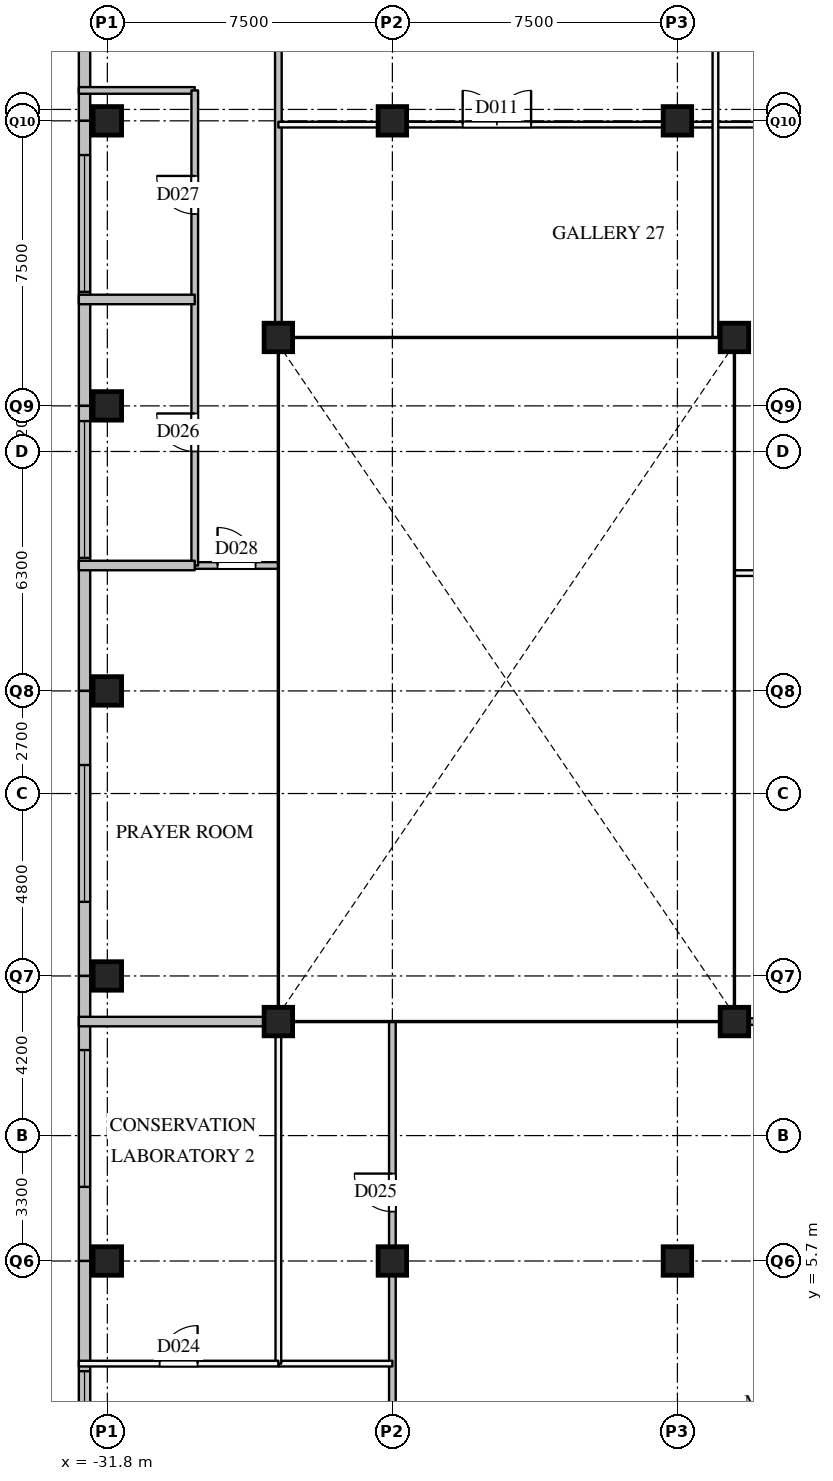
"""IFC4 building model, lengths in metres.
Left out: names, types, materials, properties, quantities, classifications, styles, units other than length and angle.
Written with IfcOpenShell. Run it as: python <this file> out.ifc"""

import sys

from ifc_helpers import new_model, si_unit, direction, frame, frame_2d, origin, origin_2d, place, context, subcontext, project, spatial, rectangle, extrude, element, fill, save


model = new_model("IFC4")
c1 = context("Model", 3, precision=1e-05, world=origin(), true_north=direction((0.0, 1.0)))
c2 = subcontext(c1, "Body", "Model", "MODEL_VIEW")
j1 = project(units=[si_unit("LENGTHUNIT", "METRE"), si_unit("PLANEANGLEUNIT", "RADIAN")], contexts=[c1])
p1 = place(None, origin())
s1 = spatial("IfcSite", under=j1, at=p1, CompositionType="ELEMENT")
p2 = place(p1, origin())
s2 = spatial("IfcBuilding", under=s1, at=p2, CompositionType="ELEMENT")
p3 = place(p2, frame((0.0, 0.0, 21.0)))
s3 = spatial("IfcBuildingStorey", under=s2, at=p3, CompositionType="ELEMENT", Elevation=21.0)
for number, where, z_axis, x_axis in (
    (1, (-31.8, 5.7, 0.0), (0.0, 0.0, 1.0), (1.0, 0.0, 0.0)),
    (2, (-31.8, 13.2, 0.0), (0.0, 0.0, 1.0), (1.0, 0.0, 0.0)),
    (3, (-31.8, 20.7, 0.0), (0.0, 0.0, 1.0), (1.0, 0.0, 0.0)),
    (4, (-31.8, 28.2, 0.0), (0.0, 0.0, 1.0), (1.0, 0.0, 0.0)),
    (5, (-31.8, 35.7, 0.0), (0.0, 0.0, 1.0), (1.0, 0.0, 0.0)),
    (6, (-24.3, 5.7, 0.0), (0.0, 0.0, 1.0), (1.0, 0.0, 0.0)),
    (7, (-24.3, 35.7, 0.0), (0.0, 0.0, 1.0), (1.0, 0.0, 0.0)),
    (8, (-16.8, 5.7, 0.0), (0.0, 0.0, 1.0), (1.0, 0.0, 0.0)),
    (9, (-16.8, 35.7, 0.0), (0.0, 0.0, 1.0), (1.0, 0.0, 0.0)),
    (10, (-27.3, 12.0, 0.0), (0.0, 0.0, 1.0), (1.0, 0.0, 0.0)),
    (11, (-15.3, 12.0, 0.0), (0.0, 0.0, 1.0), (1.0, 0.0, 0.0)),
    (12, (-15.3, 30.0, 0.0), (0.0, 0.0, 1.0), (1.0, 0.0, 0.0)),
    (13, (-27.3, 30.0, 0.0), (0.0, 0.0, 1.0), (1.0, 0.0, 0.0)),
):
    element("IfcColumn", number, at=place(p3, frame(where, z_axis=z_axis, x_axis=x_axis)), inside=s3, PredefinedType="COLUMN", context=c2, shape_type="SweptSolid", body=[
        extrude(rectangle(XDim=0.75, YDim=0.75, at=origin_2d()), origin(), (0.0, 0.0, 1.0), 5.0),
    ])
p4 = place(p3, frame((-32.4, 43.2, 0.0), z_axis=(0.0, 0.0, 1.0), x_axis=(0.0, -1.0, 0.0)))
e14 = element("IfcWall", 14, at=p4, inside=s3, PredefinedType="SOLIDWALL", context=c2, shape_type="SweptSolid", body=[
    extrude(rectangle(XDim=7.5, YDim=0.3, at=frame_2d((3.75, 0.0))), origin(), (0.0, 0.0, 1.0), 4.59),
])
p5 = place(p4, frame((1.95, 0.0, 2.4)))
e15 = element("IfcOpeningElement", 15, at=p5, cuts=e14, PredefinedType="OPENING", context=c2, shape_type="SweptSolid", body=[
    extrude(rectangle(XDim=3.6, YDim=1.2, at=frame_2d((1.8, 0.6))), frame((0.0, 0.16, 0.0), z_axis=(0.0, -1.0, 0.0), x_axis=(1.0, 0.0, 0.0)), (0.0, 0.0, 1.0), 0.32),
])
p6 = place(p3, frame((-32.4, 35.7, 0.0), z_axis=(0.0, 0.0, 1.0), x_axis=(0.0, -1.0, 0.0)))
e16 = element("IfcWall", 16, at=p6, inside=s3, PredefinedType="SOLIDWALL", context=c2, shape_type="SweptSolid", body=[
    extrude(rectangle(XDim=7.5, YDim=0.3, at=frame_2d((3.75, 0.0))), origin(), (0.0, 0.0, 1.0), 4.59),
])
p7 = place(p6, frame((0.9, 0.0, 2.4)))
e17 = element("IfcOpeningElement", 17, at=p7, cuts=e16, PredefinedType="OPENING", context=c2, shape_type="SweptSolid", body=[
    extrude(rectangle(XDim=3.6, YDim=1.2, at=frame_2d((1.8, 0.6))), frame((0.0, 0.16, 0.0), z_axis=(0.0, -1.0, 0.0), x_axis=(1.0, 0.0, 0.0)), (0.0, 0.0, 1.0), 0.32),
])
p8 = place(p3, frame((-32.4, 28.2, 0.0), z_axis=(0.0, 0.0, 1.0), x_axis=(0.0, -1.0, 0.0)))
e18 = element("IfcWall", 18, at=p8, inside=s3, PredefinedType="SOLIDWALL", context=c2, shape_type="SweptSolid", body=[
    extrude(rectangle(XDim=7.5, YDim=0.3, at=frame_2d((3.75, 0.0))), origin(), (0.0, 0.0, 1.0), 4.59),
])
p9 = place(p8, frame((0.4, 0.0, 2.4)))
e19 = element("IfcOpeningElement", 19, at=p9, cuts=e18, PredefinedType="OPENING", context=c2, shape_type="SweptSolid", body=[
    extrude(rectangle(XDim=3.6, YDim=1.2, at=frame_2d((1.8, 0.6))), frame((0.0, 0.16, 0.0), z_axis=(0.0, -1.0, 0.0), x_axis=(1.0, 0.0, 0.0)), (0.0, 0.0, 1.0), 0.32),
])
p10 = place(p3, frame((-32.4, 20.7, 0.0), z_axis=(0.0, 0.0, 1.0), x_axis=(0.0, -1.0, 0.0)))
e20 = element("IfcWall", 20, at=p10, inside=s3, PredefinedType="SOLIDWALL", context=c2, shape_type="SweptSolid", body=[
    extrude(rectangle(XDim=7.5, YDim=0.3, at=frame_2d((3.75, 0.0))), origin(), (0.0, 0.0, 1.0), 4.59),
])
p11 = place(p10, frame((1.95, 0.0, 2.4)))
e21 = element("IfcOpeningElement", 21, at=p11, cuts=e20, PredefinedType="OPENING", context=c2, shape_type="SweptSolid", body=[
    extrude(rectangle(XDim=3.6, YDim=1.2, at=frame_2d((1.8, 0.6))), frame((0.0, 0.16, 0.0), z_axis=(0.0, -1.0, 0.0), x_axis=(1.0, 0.0, 0.0)), (0.0, 0.0, 1.0), 0.32),
])
p12 = place(p3, frame((-32.4, 13.2, 0.0), z_axis=(0.0, 0.0, 1.0), x_axis=(0.0, -1.0, 0.0)))
e22 = element("IfcWall", 22, at=p12, inside=s3, PredefinedType="SOLIDWALL", context=c2, shape_type="SweptSolid", body=[
    extrude(rectangle(XDim=7.5, YDim=0.3, at=frame_2d((3.75, 0.0))), origin(), (0.0, 0.0, 1.0), 4.59),
])
p13 = place(p12, frame((1.95, 0.0, 2.4)))
e23 = element("IfcOpeningElement", 23, at=p13, cuts=e22, PredefinedType="OPENING", context=c2, shape_type="SweptSolid", body=[
    extrude(rectangle(XDim=3.6, YDim=1.2, at=frame_2d((1.8, 0.6))), frame((0.0, 0.16, 0.0), z_axis=(0.0, -1.0, 0.0), x_axis=(1.0, 0.0, 0.0)), (0.0, 0.0, 1.0), 0.32),
])
p14 = place(p3, frame((-32.4, 5.7, 0.0), z_axis=(0.0, 0.0, 1.0), x_axis=(0.0, -1.0, 0.0)))
e24 = element("IfcWall", 24, at=p14, inside=s3, PredefinedType="SOLIDWALL", context=c2, shape_type="SweptSolid", body=[
    extrude(rectangle(XDim=7.5, YDim=0.3, at=frame_2d((3.75, 0.0))), origin(), (0.0, 0.0, 1.0), 4.59),
])
p15 = place(p14, frame((2.9, 0.0, 2.4)))
e25 = element("IfcOpeningElement", 25, at=p15, cuts=e24, PredefinedType="OPENING", context=c2, shape_type="SweptSolid", body=[
    extrude(rectangle(XDim=3.6, YDim=1.2, at=frame_2d((1.8, 0.6))), frame((0.0, 0.16, 0.0), z_axis=(0.0, -1.0, 0.0), x_axis=(1.0, 0.0, 0.0)), (0.0, 0.0, 1.0), 0.32),
])
p16 = place(p3, frame((-15.3, 12.0, 0.0), z_axis=(0.0, 0.0, 1.0), x_axis=(1.0, 0.0, 0.0)))
e26 = element("IfcWall", 26, at=p16, inside=s3, PredefinedType="PARTITIONING", context=c2, shape_type="SweptSolid", body=[
    extrude(rectangle(XDim=11.25, YDim=0.175, at=frame_2d((5.625, 0.0))), origin(), (0.0, 0.0, 1.0), 3.79),
])
p17 = place(p3, frame((-29.5, 24.0, 0.0), z_axis=(0.0, 0.0, 1.0), x_axis=(1.0, 0.0, 0.0)))
e27 = element("IfcWall", 27, at=p17, inside=s3, PredefinedType="PARTITIONING", context=c2, shape_type="SweptSolid", body=[
    extrude(rectangle(XDim=2.2, YDim=0.175, at=frame_2d((1.1, 0.0))), origin(), (0.0, 0.0, 1.0), 4.55),
])
p18 = place(p17, frame((0.6, 0.0, 0.0)))
e28 = element("IfcOpeningElement", 28, at=p18, cuts=e27, PredefinedType="OPENING", context=c2, shape_type="SweptSolid", body=[
    extrude(rectangle(XDim=1.0, YDim=2.1, at=frame_2d((0.5, 1.05))), frame((0.0, 0.097, 0.0), z_axis=(0.0, -1.0, 0.0), x_axis=(1.0, 0.0, 0.0)), (0.0, 0.0, 1.0), 0.195),
])
p19 = place(p3, frame((-32.55, 36.5, 0.0), z_axis=(0.0, 0.0, 1.0), x_axis=(1.0, 0.0, 0.0)))
e29 = element("IfcWall", 29, at=p19, inside=s3, PredefinedType="PARTITIONING", context=c2, shape_type="SweptSolid", body=[
    extrude(rectangle(XDim=3.05, YDim=0.175, at=frame_2d((1.525, 0.0))), origin(), (0.0, 0.0, 1.0), 3.79),
])
p20 = place(p3, frame((-29.5, 24.0, 0.0), z_axis=(0.0, 0.0, 1.0), x_axis=(0.0, 1.0, 0.0)))
e30 = element("IfcWall", 30, at=p20, inside=s3, PredefinedType="PARTITIONING", context=c2, shape_type="SweptSolid", body=[
    extrude(rectangle(XDim=12.5, YDim=0.175, at=frame_2d((6.25, 0.0))), origin(), (0.0, 0.0, 1.0), 3.79),
])
p21 = place(p20, frame((3.0, 0.0, 0.0)))
e31 = element("IfcOpeningElement", 31, at=p21, cuts=e30, PredefinedType="OPENING", context=c2, shape_type="SweptSolid", body=[
    extrude(rectangle(XDim=1.0, YDim=2.1, at=frame_2d((0.5, 1.05))), frame((0.0, 0.097, 0.0), z_axis=(0.0, -1.0, 0.0), x_axis=(1.0, 0.0, 0.0)), (0.0, 0.0, 1.0), 0.195),
])
p22 = place(p20, frame((9.25, 0.0, 0.0)))
e32 = element("IfcOpeningElement", 32, at=p22, cuts=e30, PredefinedType="OPENING", context=c2, shape_type="SweptSolid", body=[
    extrude(rectangle(XDim=1.0, YDim=2.1, at=frame_2d((0.5, 1.05))), frame((0.0, 0.097, 0.0), z_axis=(0.0, -1.0, 0.0), x_axis=(1.0, 0.0, 0.0)), (0.0, 0.0, 1.0), 0.195),
])
p23 = place(p3, frame((-27.3, 30.0, 0.0), z_axis=(0.0, 0.0, 1.0), x_axis=(0.0, 1.0, 0.0)))
e33 = element("IfcWall", 33, at=p23, inside=s3, PredefinedType="PARTITIONING", context=c2, shape_type="SweptSolid", body=[
    extrude(rectangle(XDim=17.35, YDim=0.175, at=frame_2d((8.675, 0.0))), origin(), (0.0, 0.0, 1.0), 3.79),
])
p24 = place(p23, frame((10.975, 0.0, 0.0)))
e34 = element("IfcOpeningElement", 34, at=p24, cuts=e33, PredefinedType="OPENING", context=c2, shape_type="SweptSolid", body=[
    extrude(rectangle(XDim=1.0, YDim=2.1, at=frame_2d((0.5, 1.05))), frame((0.0, 0.097, 0.0), z_axis=(0.0, -1.0, 0.0), x_axis=(1.0, 0.0, 0.0)), (0.0, 0.0, 1.0), 0.195),
])
p25 = place(p3, frame((-24.3, -9.3, 0.0), z_axis=(0.0, 0.0, 1.0), x_axis=(0.0, 1.0, 0.0)))
e35 = element("IfcWall", 35, at=p25, inside=s3, PredefinedType="PARTITIONING", context=c2, shape_type="SweptSolid", body=[
    extrude(rectangle(XDim=21.3, YDim=0.175, at=frame_2d((10.65, 0.0))), origin(), (0.0, 0.0, 1.0), 3.79),
])
p26 = place(p25, frame((2.5, 0.0, 0.0)))
e36 = element("IfcOpeningElement", 36, at=p26, cuts=e35, PredefinedType="OPENING", context=c2, shape_type="SweptSolid", body=[
    extrude(rectangle(XDim=1.0, YDim=2.1, at=frame_2d((0.5, 1.05))), frame((0.0, 0.097, 0.0), z_axis=(0.0, -1.0, 0.0), x_axis=(1.0, 0.0, 0.0)), (0.0, 0.0, 1.0), 0.195),
])
p27 = place(p25, frame((16.3, 0.0, 0.0)))
e37 = element("IfcOpeningElement", 37, at=p27, cuts=e35, PredefinedType="OPENING", context=c2, shape_type="SweptSolid", body=[
    extrude(rectangle(XDim=1.0, YDim=2.1, at=frame_2d((0.5, 1.05))), frame((0.0, 0.097, 0.0), z_axis=(0.0, -1.0, 0.0), x_axis=(1.0, 0.0, 0.0)), (0.0, 0.0, 1.0), 0.195),
])
p28 = place(p3, frame((-27.3, 3.0, 0.0), z_axis=(0.0, 0.0, 1.0), x_axis=(1.0, 0.0, 0.0)))
e38 = element("IfcWall", 38, at=p28, inside=s3, PredefinedType="PARTITIONING", context=c2, shape_type="SweptSolid", body=[
    extrude(rectangle(XDim=3.0, YDim=0.15, at=frame_2d((1.5, 0.0))), origin(), (0.0, 0.0, 1.0), 3.79),
])
p29 = place(p3, frame((-15.3, 23.8, 0.0), z_axis=(0.0, 0.0, 1.0), x_axis=(1.0, 0.0, 0.0)))
e39 = element("IfcWall", 39, at=p29, inside=s3, PredefinedType="PARTITIONING", context=c2, shape_type="SweptSolid", body=[
    extrude(rectangle(XDim=11.25, YDim=0.15, at=frame_2d((5.625, 0.0))), origin(), (0.0, 0.0, 1.0), 3.79),
])
p30 = place(p3, frame((-27.3, 35.6, 0.0), z_axis=(0.0, 0.0, 1.0), x_axis=(1.0, 0.0, 0.0)))
e40 = element("IfcWall", 40, at=p30, inside=s3, PredefinedType="PARTITIONING", context=c2, shape_type="SweptSolid", body=[
    extrude(rectangle(XDim=23.25, YDim=0.15, at=frame_2d((11.625, 0.0))), origin(), (0.0, 0.0, 1.0), 3.79),
])
p31 = place(p30, frame((4.85, 0.0, 0.0)))
e41 = element("IfcOpeningElement", 41, at=p31, cuts=e40, PredefinedType="OPENING", context=c2, shape_type="SweptSolid", body=[
    extrude(rectangle(XDim=1.8, YDim=2.1, at=frame_2d((0.9, 1.05))), frame((0.0, 0.085, 0.0), z_axis=(0.0, -1.0, 0.0), x_axis=(1.0, 0.0, 0.0)), (0.0, 0.0, 1.0), 0.17),
])
p32 = place(p3, frame((-27.3, 3.0, 0.0), z_axis=(0.0, 0.0, 1.0), x_axis=(0.0, 1.0, 0.0)))
e42 = element("IfcWall", 42, at=p32, inside=s3, PredefinedType="PARTITIONING", context=c2, shape_type="SweptSolid", body=[
    extrude(rectangle(XDim=9.0, YDim=0.15, at=frame_2d((4.5, 0.0))), origin(), (0.0, 0.0, 1.0), 3.79),
])
p33 = place(p3, frame((-15.8, 30.0, 0.0), z_axis=(0.0, 0.0, 1.0), x_axis=(0.0, 1.0, 0.0)))
e43 = element("IfcWall", 43, at=p33, inside=s3, PredefinedType="PARTITIONING", context=c2, shape_type="SweptSolid", body=[
    extrude(rectangle(XDim=17.4, YDim=0.15, at=frame_2d((8.7, 0.0))), origin(), (0.0, 0.0, 1.0), 3.79),
])
p34 = place(p3, frame((-32.55, 3.0, 0.0), z_axis=(0.0, 0.0, 1.0), x_axis=(1.0, 0.0, 0.0)))
e44 = element("IfcWall", 44, at=p34, inside=s3, PredefinedType="PARTITIONING", context=c2, shape_type="SweptSolid", body=[
    extrude(rectangle(XDim=5.25, YDim=0.15, at=frame_2d((2.625, 0.0))), origin(), (0.0, 0.0, 1.0), 3.79),
])
p35 = place(p34, frame((2.125, 0.0, 0.0)))
e45 = element("IfcOpeningElement", 45, at=p35, cuts=e44, PredefinedType="OPENING", context=c2, shape_type="SweptSolid", body=[
    extrude(rectangle(XDim=1.0, YDim=2.1, at=frame_2d((0.5, 1.05))), frame((0.0, 0.085, 0.0), z_axis=(0.0, -1.0, 0.0), x_axis=(1.0, 0.0, 0.0)), (0.0, 0.0, 1.0), 0.17),
])
p36 = place(p3, frame((-32.55, 12.0, 0.0), z_axis=(0.0, 0.0, 1.0), x_axis=(1.0, 0.0, 0.0)))
e46 = element("IfcWall", 46, at=p36, inside=s3, PredefinedType="PARTITIONING", context=c2, shape_type="SweptSolid", body=[
    extrude(rectangle(XDim=5.25, YDim=0.25, at=frame_2d((2.625, 0.0))), origin(), (0.0, 0.0, 1.0), 3.79),
])
for number, where, z_axis, x_axis in (
    (47, (-32.55, 24.0, 0.0), (0.0, 0.0, 1.0), (1.0, 0.0, 0.0)),
    (48, (-32.55, 31.0, 0.0), (0.0, 0.0, 1.0), (1.0, 0.0, 0.0)),
):
    element("IfcWall", number, at=place(p3, frame(where, z_axis=z_axis, x_axis=x_axis)), inside=s3, PredefinedType="PARTITIONING", context=c2, shape_type="SweptSolid", body=[
        extrude(rectangle(XDim=3.05, YDim=0.25, at=frame_2d((1.525, 0.0))), origin(), (0.0, 0.0, 1.0), 3.79),
    ])
p37 = place(p7, origin())
e49 = element("IfcWindow", 49, at=p37, inside=s3, PartitioningType="SINGLE_PANEL", PredefinedType="WINDOW", context=c2, shape_type="SweptSolid", body=[
    extrude(rectangle(XDim=3.6, YDim=1.2, at=frame_2d((1.8, 0.6))), frame((0.0, 0.03, 0.0), z_axis=(0.0, -1.0, 0.0), x_axis=(1.0, 0.0, 0.0)), (0.0, 0.0, 1.0), 0.06),
])
fill(e17, e49)
p38 = place(p9, origin())
e50 = element("IfcWindow", 50, at=p38, inside=s3, PartitioningType="SINGLE_PANEL", PredefinedType="WINDOW", context=c2, shape_type="SweptSolid", body=[
    extrude(rectangle(XDim=3.6, YDim=1.2, at=frame_2d((1.8, 0.6))), frame((0.0, 0.03, 0.0), z_axis=(0.0, -1.0, 0.0), x_axis=(1.0, 0.0, 0.0)), (0.0, 0.0, 1.0), 0.06),
])
fill(e19, e50)
p39 = place(p11, origin())
e51 = element("IfcWindow", 51, at=p39, inside=s3, PartitioningType="SINGLE_PANEL", PredefinedType="WINDOW", context=c2, shape_type="SweptSolid", body=[
    extrude(rectangle(XDim=3.6, YDim=1.2, at=frame_2d((1.8, 0.6))), frame((0.0, 0.03, 0.0), z_axis=(0.0, -1.0, 0.0), x_axis=(1.0, 0.0, 0.0)), (0.0, 0.0, 1.0), 0.06),
])
fill(e21, e51)
p40 = place(p13, origin())
e52 = element("IfcWindow", 52, at=p40, inside=s3, PartitioningType="SINGLE_PANEL", PredefinedType="WINDOW", context=c2, shape_type="SweptSolid", body=[
    extrude(rectangle(XDim=3.6, YDim=1.2, at=frame_2d((1.8, 0.6))), frame((0.0, 0.03, 0.0), z_axis=(0.0, -1.0, 0.0), x_axis=(1.0, 0.0, 0.0)), (0.0, 0.0, 1.0), 0.06),
])
fill(e23, e52)
p41 = place(p15, origin())
e53 = element("IfcWindow", 53, at=p41, inside=s3, PartitioningType="SINGLE_PANEL", PredefinedType="WINDOW", context=c2, shape_type="SweptSolid", body=[
    extrude(rectangle(XDim=3.6, YDim=1.2, at=frame_2d((1.8, 0.6))), frame((0.0, 0.03, 0.0), z_axis=(0.0, -1.0, 0.0), x_axis=(1.0, 0.0, 0.0)), (0.0, 0.0, 1.0), 0.06),
])
fill(e25, e53)
p42 = place(p31, origin())
e54 = element("IfcDoor", 54, at=p42, inside=s3, OperationType="DOUBLE_DOOR_SINGLE_SWING", PredefinedType="DOOR", context=c2, shape_type="SweptSolid", body=[
    extrude(rectangle(XDim=1.8, YDim=2.1, at=frame_2d((0.9, 1.05))), frame((0.0, 0.025, 0.0), z_axis=(0.0, -1.0, 0.0), x_axis=(1.0, 0.0, 0.0)), (0.0, 0.0, 1.0), 0.05),
])
fill(e41, e54)
p43 = place(p35, origin())
e55 = element("IfcDoor", 55, at=p43, inside=s3, OperationType="SINGLE_SWING_RIGHT", PredefinedType="DOOR", context=c2, shape_type="SweptSolid", body=[
    extrude(rectangle(XDim=1.0, YDim=2.1, at=frame_2d((0.5, 1.05))), frame((0.0, 0.025, 0.0), z_axis=(0.0, -1.0, 0.0), x_axis=(1.0, 0.0, 0.0)), (0.0, 0.0, 1.0), 0.05),
])
fill(e45, e55)
p44 = place(p27, origin())
e56 = element("IfcDoor", 56, at=p44, inside=s3, OperationType="SINGLE_SWING_RIGHT", PredefinedType="DOOR", context=c2, shape_type="SweptSolid", body=[
    extrude(rectangle(XDim=1.0, YDim=2.1, at=frame_2d((0.5, 1.05))), frame((0.0, 0.025, 0.0), z_axis=(0.0, -1.0, 0.0), x_axis=(1.0, 0.0, 0.0)), (0.0, 0.0, 1.0), 0.05),
])
fill(e37, e56)
p45 = place(p21, origin())
e57 = element("IfcDoor", 57, at=p45, inside=s3, OperationType="SINGLE_SWING_RIGHT", PredefinedType="DOOR", context=c2, shape_type="SweptSolid", body=[
    extrude(rectangle(XDim=1.0, YDim=2.1, at=frame_2d((0.5, 1.05))), frame((0.0, 0.025, 0.0), z_axis=(0.0, -1.0, 0.0), x_axis=(1.0, 0.0, 0.0)), (0.0, 0.0, 1.0), 0.05),
])
fill(e31, e57)
p46 = place(p22, origin())
e58 = element("IfcDoor", 58, at=p46, inside=s3, OperationType="SINGLE_SWING_RIGHT", PredefinedType="DOOR", context=c2, shape_type="SweptSolid", body=[
    extrude(rectangle(XDim=1.0, YDim=2.1, at=frame_2d((0.5, 1.05))), frame((0.0, 0.025, 0.0), z_axis=(0.0, -1.0, 0.0), x_axis=(1.0, 0.0, 0.0)), (0.0, 0.0, 1.0), 0.05),
])
fill(e32, e58)
p47 = place(p18, origin())
e59 = element("IfcDoor", 59, at=p47, inside=s3, OperationType="SINGLE_SWING_LEFT", PredefinedType="DOOR", context=c2, shape_type="SweptSolid", body=[
    extrude(rectangle(XDim=1.0, YDim=2.1, at=frame_2d((0.5, 1.05))), frame((0.0, 0.025, 0.0), z_axis=(0.0, -1.0, 0.0), x_axis=(1.0, 0.0, 0.0)), (0.0, 0.0, 1.0), 0.05),
])
fill(e28, e59)
save(model, sys.argv[1])
